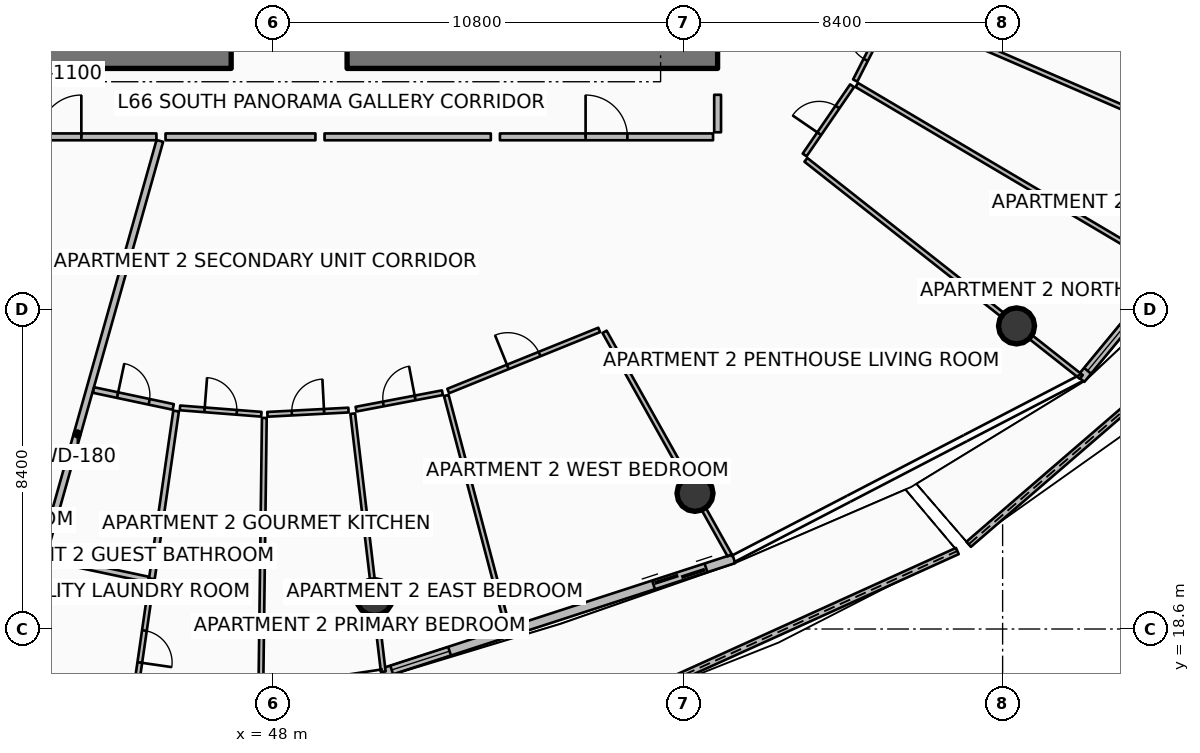
"""IFC4 building model, lengths in metres.
Left out: names, types, materials, properties, quantities, classifications, styles, units other than length and angle.
Written with IfcOpenShell. Run it as: python <this file> out.ifc"""

import sys

from ifc_helpers import new_model, si_unit, direction, frame, frame_2d, origin, origin_2d, place, context, subcontext, project, spatial, polyline, rectangle, circle, outline, extrude, element, fill, save


model = new_model("IFC4")
c1 = context("Model", 3, precision=1e-05, world=origin(), true_north=direction((0.0, 1.0)))
c2 = subcontext(c1, "Body", "Model", "MODEL_VIEW")
j1 = project(units=[si_unit("LENGTHUNIT", "METRE"), si_unit("PLANEANGLEUNIT", "RADIAN")], contexts=[c1])
p1 = place(None, origin())
s1 = spatial("IfcSite", under=j1, at=p1, CompositionType="ELEMENT")
p2 = place(p1, origin())
s2 = spatial("IfcBuilding", under=s1, at=p2, CompositionType="ELEMENT")
p3 = place(p2, frame((0.0, 0.0, 263.65)))
s3 = spatial("IfcBuildingStorey", under=s2, at=p3, CompositionType="ELEMENT", Elevation=263.65)
for number, where, z_axis, x_axis in (
    (1, (37.15, 33.675, 0.0), (0.0, 0.0, 1.0), (1.0, 0.0, 0.0)),
    (2, (49.95, 33.675, 0.0), (0.0, 0.0, 1.0), (1.0, 0.0, 0.0)),
):
    element("IfcWall", number, at=place(p3, frame(where, z_axis=z_axis, x_axis=x_axis)), inside=s3, PredefinedType="SHEAR", context=c2, shape_type="SweptSolid", body=[
        extrude(rectangle(XDim=9.75, YDim=0.65, at=frame_2d((4.875, 0.0))), origin(), (0.0, 0.0, 1.0), 3.85),
    ])
for number, where, z_axis, x_axis in (
    (3, (50.671, 19.429, 0.0), (0.0, 0.0, 1.0), (1.0, 0.0, 0.0)),
    (4, (59.105, 22.17, 0.0), (0.0, 0.0, 1.0), (1.0, 0.0, 0.0)),
    (5, (67.566, 26.575, 0.0), (0.0, 0.0, 1.0), (1.0, 0.0, 0.0)),
):
    element("IfcColumn", number, at=place(p3, frame(where, z_axis=z_axis, x_axis=x_axis)), inside=s3, PredefinedType="COLUMN", context=c2, shape_type="SweptSolid", body=[
        extrude(circle(Radius=0.475, at=origin_2d()), origin(), (0.0, 0.0, 1.0), 3.59),
    ])
p4 = place(p3, frame((56.466, 16.33, 0.0), z_axis=(0.0, 0.0, 1.0), x_axis=(0.910900469726, 0.412626143444, 0.0)))
e6 = element("IfcWall", 6, at=p4, inside=s3, PredefinedType="PARAPET", context=c2, shape_type="SweptSolid", body=[
    extrude(outline(polyline([(0.0, 0.0), (10.476, 0.0), (10.476, 1.497), (5.238, 1.696), (0.0, 1.832), (0.0, 0.0)])), frame((0.0, 0.09, 0.0), z_axis=(0.0, -1.0, 0.0), x_axis=(1.0, 0.0, 0.0)), (0.0, 0.0, 1.0), 0.18),
])
p5 = place(p3, frame((66.306, 20.83, 0.0), z_axis=(0.0, 0.0, 1.0), x_axis=(0.757188428153, 0.653196512751, 0.0)))
e7 = element("IfcWall", 7, at=p5, inside=s3, PredefinedType="PARAPET", context=c2, shape_type="SweptSolid", body=[
    extrude(outline(polyline([(0.0, 0.0), (11.278, 0.0), (11.278, 1.148), (5.639, 1.284), (0.0, 1.483), (0.0, 0.0)])), frame((0.0, 0.09, 0.0), z_axis=(0.0, -1.0, 0.0), x_axis=(1.0, 0.0, 0.0)), (0.0, 0.0, 1.0), 0.18),
])
p6 = place(p3, frame((50.858, 17.436, 0.0), z_axis=(0.0, 0.0, 1.0), x_axis=(0.951055974609, 0.309018661507, 0.0)))
e8 = element("IfcWall", 8, at=p6, inside=s3, PredefinedType="SOLIDWALL", context=c2, shape_type="SweptSolid", body=[
    extrude(rectangle(XDim=9.745, YDim=0.24, at=frame_2d((4.873, 0.0))), origin(), (0.0, 0.0, 1.0), 2.54),
])
p7 = place(p6, frame((7.525, 0.0, 0.0)))
e9 = element("IfcOpeningElement", 9, at=p7, cuts=e8, PredefinedType="OPENING", context=c2, shape_type="SweptSolid", body=[
    extrude(rectangle(XDim=1.45, YDim=2.15, at=frame_2d((0.725, 1.075))), frame((0.0, 0.13, 0.0), z_axis=(0.0, -1.0, 0.0), x_axis=(1.0, 0.0, 0.0)), (0.0, 0.0, 1.0), 0.26),
])
p8 = place(p6, frame((0.28, 0.0, 0.65)))
e10 = element("IfcOpeningElement", 10, at=p8, cuts=e8, PredefinedType="OPENING", context=c2, shape_type="SweptSolid", body=[
    extrude(rectangle(XDim=1.6, YDim=1.5, at=frame_2d((0.8, 0.75))), frame((0.0, 0.13, 0.0), z_axis=(0.0, -1.0, 0.0), x_axis=(1.0, 0.0, 0.0)), (0.0, 0.0, 1.0), 0.26),
])
p9 = place(p3, frame((69.258, 25.178, 0.0), z_axis=(0.0, 0.0, 1.0), x_axis=(0.636680093065, 0.771128043255, 0.0)))
e11 = element("IfcWall", 11, at=p9, inside=s3, PredefinedType="SOLIDWALL", context=c2, shape_type="SweptSolid", body=[
    extrude(rectangle(XDim=11.438, YDim=0.24, at=frame_2d((5.719, 0.0))), origin(), (0.0, 0.0, 1.0), 2.54),
])
p10 = place(p9, frame((9.218, 0.0, 0.0)))
e12 = element("IfcOpeningElement", 12, at=p10, cuts=e11, PredefinedType="OPENING", context=c2, shape_type="SweptSolid", body=[
    extrude(rectangle(XDim=1.45, YDim=2.15, at=frame_2d((0.725, 1.075))), frame((0.0, 0.13, 0.0), z_axis=(0.0, -1.0, 0.0), x_axis=(1.0, 0.0, 0.0)), (0.0, 0.0, 1.0), 0.26),
])
p11 = place(p9, frame((0.28, 0.0, 0.65)))
e13 = element("IfcOpeningElement", 13, at=p11, cuts=e11, PredefinedType="OPENING", context=c2, shape_type="SweptSolid", body=[
    extrude(rectangle(XDim=1.6, YDim=1.5, at=frame_2d((0.8, 0.75))), frame((0.0, 0.13, 0.0), z_axis=(0.0, -1.0, 0.0), x_axis=(1.0, 0.0, 0.0)), (0.0, 0.0, 1.0), 0.26),
])
p12 = place(p3, frame((45.023, 31.444, 0.0), z_axis=(0.0, 0.0, 1.0), x_axis=(-0.271442063103, -0.962454781472, 0.0)))
e14 = element("IfcWall", 14, at=p12, inside=s3, PredefinedType="PARTITIONING", context=c2, shape_type="SweptSolid", body=[
    extrude(rectangle(XDim=16.017, YDim=0.18, at=frame_2d((8.008, 0.0))), origin(), (0.0, 0.0, 1.0), 2.957),
])
p13 = place(p3, frame((39.882, 31.55, 0.0), z_axis=(0.0, 0.0, 1.0), x_axis=(1.0, 0.0, 0.0)))
e15 = element("IfcWall", 15, at=p13, inside=s3, PredefinedType="PARTITIONING", context=c2, shape_type="SweptSolid", body=[
    extrude(rectangle(XDim=5.051, YDim=0.18, at=frame_2d((2.525, 0.0))), origin(), (0.0, 0.0, 1.0), 2.957),
])
p14 = place(p13, frame((1.975, 0.0, 0.0)))
e16 = element("IfcOpeningElement", 16, at=p14, cuts=e15, PredefinedType="OPENING", context=c2, shape_type="SweptSolid", body=[
    extrude(rectangle(XDim=1.1, YDim=2.1, at=frame_2d((0.55, 1.05))), frame((0.0, 0.1, 0.0), z_axis=(0.0, -1.0, 0.0), x_axis=(1.0, 0.0, 0.0)), (0.0, 0.0, 1.0), 0.2),
])
p15 = place(p3, frame((53.972, 31.55, 0.0), z_axis=(0.0, 0.0, 1.0), x_axis=(1.0, 0.0, 0.0)))
e17 = element("IfcWall", 17, at=p15, inside=s3, PredefinedType="PARTITIONING", context=c2, shape_type="SweptSolid", body=[
    extrude(rectangle(XDim=5.608, YDim=0.18, at=frame_2d((2.804, 0.0))), origin(), (0.0, 0.0, 1.0), 2.957),
])
p16 = place(p15, frame((2.254, 0.0, 0.0)))
e18 = element("IfcOpeningElement", 18, at=p16, cuts=e17, PredefinedType="OPENING", context=c2, shape_type="SweptSolid", body=[
    extrude(rectangle(XDim=1.1, YDim=2.1, at=frame_2d((0.55, 1.05))), frame((0.0, 0.1, 0.0), z_axis=(0.0, -1.0, 0.0), x_axis=(1.0, 0.0, 0.0)), (0.0, 0.0, 1.0), 0.2),
])
p17 = place(p3, frame((59.7, 31.67, 0.0), z_axis=(0.0, 0.0, 1.0), x_axis=(0.0, 1.0, 0.0)))
e19 = element("IfcWall", 19, at=p17, inside=s3, PredefinedType="PARTITIONING", context=c2, shape_type="SweptSolid", body=[
    extrude(rectangle(XDim=0.987, YDim=0.18, at=frame_2d((0.493, 0.0))), origin(), (0.0, 0.0, 1.0), 2.957),
])
p18 = place(p3, frame((45.173, 31.55, 0.0), z_axis=(0.0, 0.0, 1.0), x_axis=(1.0, 0.0, 0.0)))
e20 = element("IfcWall", 20, at=p18, inside=s3, PredefinedType="PARTITIONING", context=c2, shape_type="SweptSolid", body=[
    extrude(rectangle(XDim=3.944, YDim=0.18, at=frame_2d((1.972, 0.0))), origin(), (0.0, 0.0, 1.0), 2.957),
])
p19 = place(p3, frame((43.278, 24.889, 0.0), z_axis=(0.0, 0.0, 1.0), x_axis=(0.978223618973, -0.207553731074, 0.0)))
e21 = element("IfcWall", 21, at=p19, inside=s3, PredefinedType="PARTITIONING", context=c2, shape_type="SweptSolid", body=[
    extrude(rectangle(XDim=2.144, YDim=0.15, at=frame_2d((1.072, 0.0))), origin(), (0.0, 0.0, 1.0), 2.957),
])
p20 = place(p19, frame((0.647, 0.0, 0.0)))
e22 = element("IfcOpeningElement", 22, at=p20, cuts=e21, PredefinedType="OPENING", context=c2, shape_type="SweptSolid", body=[
    extrude(rectangle(XDim=0.85, YDim=2.06, at=frame_2d((0.425, 1.03))), frame((0.0, 0.085, 0.0), z_axis=(0.0, -1.0, 0.0), x_axis=(1.0, 0.0, 0.0)), (0.0, 0.0, 1.0), 0.17),
])
p21 = place(p3, frame((42.032, 20.471, 0.0), z_axis=(0.0, 0.0, 1.0), x_axis=(0.978220458767, -0.207568624914, 0.0)))
e23 = element("IfcWall", 23, at=p21, inside=s3, PredefinedType="PARTITIONING", context=c2, shape_type="SweptSolid", body=[
    extrude(rectangle(XDim=2.748, YDim=0.15, at=frame_2d((1.374, 0.0))), origin(), (0.0, 0.0, 1.0), 2.957),
])
p22 = place(p3, frame((45.451, 24.336, 0.0), z_axis=(0.0, 0.0, 1.0), x_axis=(-0.142877347864, -0.989740402059, 0.0)))
e24 = element("IfcWall", 24, at=p22, inside=s3, PredefinedType="PARTITIONING", context=c2, shape_type="SweptSolid", body=[
    extrude(rectangle(XDim=4.46, YDim=0.15, at=frame_2d((2.23, 0.0))), origin(), (0.0, 0.0, 1.0), 3.03),
])
p23 = place(p3, frame((44.795, 19.793, 0.0), z_axis=(0.0, 0.0, 1.0), x_axis=(-0.142812082151, -0.989749821516, 0.0)))
e25 = element("IfcWall", 25, at=p23, inside=s3, PredefinedType="PARTITIONING", context=c2, shape_type="SweptSolid", body=[
    extrude(rectangle(XDim=3.342, YDim=0.125, at=frame_2d((1.671, 0.0))), origin(), (0.0, 0.0, 1.0), 3.03),
])
p24 = place(p23, frame((1.246, 0.0, 0.0)))
e26 = element("IfcOpeningElement", 26, at=p24, cuts=e25, PredefinedType="OPENING", context=c2, shape_type="SweptSolid", body=[
    extrude(rectangle(XDim=0.85, YDim=2.06, at=frame_2d((0.425, 1.03))), frame((0.0, 0.073, 0.0), z_axis=(0.0, -1.0, 0.0), x_axis=(1.0, 0.0, 0.0)), (0.0, 0.0, 1.0), 0.145),
])
p25 = place(p3, frame((47.772, 24.154, 0.0), z_axis=(0.0, 0.0, 1.0), x_axis=(-0.012746936198, -0.999918754508, 0.0)))
e27 = element("IfcWall", 27, at=p25, inside=s3, PredefinedType="PARTITIONING", context=c2, shape_type="SweptSolid", body=[
    extrude(rectangle(XDim=7.163, YDim=0.125, at=frame_2d((3.582, 0.0))), origin(), (0.0, 0.0, 1.0), 3.03),
])
p26 = place(p3, frame((45.553, 24.418, 0.0), z_axis=(0.0, 0.0, 1.0), x_axis=(0.99694376357, -0.078122546546, 0.0)))
e28 = element("IfcWall", 28, at=p26, inside=s3, PredefinedType="PARTITIONING", context=c2, shape_type="SweptSolid", body=[
    extrude(rectangle(XDim=2.147, YDim=0.125, at=frame_2d((1.073, 0.0))), origin(), (0.0, 0.0, 1.0), 3.03),
])
p27 = place(p26, frame((0.648, 0.0, 0.0)))
e29 = element("IfcOpeningElement", 29, at=p27, cuts=e28, PredefinedType="OPENING", context=c2, shape_type="SweptSolid", body=[
    extrude(rectangle(XDim=0.85, YDim=2.06, at=frame_2d((0.425, 1.03))), frame((0.0, 0.073, 0.0), z_axis=(0.0, -1.0, 0.0), x_axis=(1.0, 0.0, 0.0)), (0.0, 0.0, 1.0), 0.145),
])
p28 = place(p3, frame((47.853, 24.249, 0.0), z_axis=(0.0, 0.0, 1.0), x_axis=(0.998618144909, 0.052552836822, 0.0)))
e30 = element("IfcWall", 30, at=p28, inside=s3, PredefinedType="PARTITIONING", context=c2, shape_type="SweptSolid", body=[
    extrude(rectangle(XDim=2.137, YDim=0.125, at=frame_2d((1.068, 0.0))), origin(), (0.0, 0.0, 1.0), 3.03),
])
p29 = place(p28, frame((0.643, 0.0, 0.0)))
e31 = element("IfcOpeningElement", 31, at=p29, cuts=e30, PredefinedType="OPENING", context=c2, shape_type="SweptSolid", body=[
    extrude(rectangle(XDim=0.85, YDim=2.06, at=frame_2d((0.425, 1.03))), frame((0.0, 0.073, 0.0), z_axis=(0.0, -1.0, 0.0), x_axis=(1.0, 0.0, 0.0)), (0.0, 0.0, 1.0), 0.145),
])
p30 = place(p3, frame((49.357, 31.55, 0.0), z_axis=(0.0, 0.0, 1.0), x_axis=(1.0, 0.0, 0.0)))
e32 = element("IfcWall", 32, at=p30, inside=s3, PredefinedType="PARTITIONING", context=c2, shape_type="SweptSolid", body=[
    extrude(rectangle(XDim=4.376, YDim=0.18, at=frame_2d((2.188, 0.0))), origin(), (0.0, 0.0, 1.0), 2.957),
])
p31 = place(p3, frame((50.099, 24.267, 0.0), z_axis=(0.0, 0.0, 1.0), x_axis=(0.117541429875, -0.993067979679, 0.0)))
e33 = element("IfcWall", 33, at=p31, inside=s3, PredefinedType="PARTITIONING", context=c2, shape_type="SweptSolid", body=[
    extrude(rectangle(XDim=6.838, YDim=0.125, at=frame_2d((3.419, 0.0))), origin(), (0.0, 0.0, 1.0), 2.957),
])
p32 = place(p3, frame((56.725, 26.42, 0.0), z_axis=(0.0, 0.0, 1.0), x_axis=(0.488624332812, -0.872494275846, 0.0)))
e34 = element("IfcWall", 34, at=p32, inside=s3, PredefinedType="PARTITIONING", context=c2, shape_type="SweptSolid", body=[
    extrude(rectangle(XDim=6.738, YDim=0.125, at=frame_2d((3.369, 0.0))), origin(), (0.0, 0.0, 1.0), 2.957),
])
p33 = place(p3, frame((52.56, 24.746, 0.0), z_axis=(0.0, 0.0, 1.0), x_axis=(0.255531000294, -0.966800862582, 0.0)))
e35 = element("IfcWall", 35, at=p33, inside=s3, PredefinedType="PARTITIONING", context=c2, shape_type="SweptSolid", body=[
    extrude(rectangle(XDim=6.311, YDim=0.125, at=frame_2d((3.155, 0.0))), origin(), (0.0, 0.0, 1.0), 3.03),
])
p34 = place(p3, frame((50.185, 24.385, 0.0), z_axis=(0.0, 0.0, 1.0), x_axis=(0.982371792313, 0.186937587627, 0.0)))
e36 = element("IfcWall", 36, at=p34, inside=s3, PredefinedType="PARTITIONING", context=c2, shape_type="SweptSolid", body=[
    extrude(rectangle(XDim=2.314, YDim=0.125, at=frame_2d((1.157, 0.0))), origin(), (0.0, 0.0, 1.0), 2.957),
])
p35 = place(p34, frame((0.732, 0.0, 0.0)))
e37 = element("IfcOpeningElement", 37, at=p35, cuts=e36, PredefinedType="OPENING", context=c2, shape_type="SweptSolid", body=[
    extrude(rectangle(XDim=0.85, YDim=2.06, at=frame_2d((0.425, 1.03))), frame((0.0, 0.073, 0.0), z_axis=(0.0, -1.0, 0.0), x_axis=(1.0, 0.0, 0.0)), (0.0, 0.0, 1.0), 0.145),
])
p36 = place(p3, frame((52.612, 24.863, 0.0), z_axis=(0.0, 0.0, 1.0), x_axis=(0.927015680649, 0.375022569762, 0.0)))
e38 = element("IfcWall", 38, at=p36, inside=s3, PredefinedType="PARTITIONING", context=c2, shape_type="SweptSolid", body=[
    extrude(rectangle(XDim=4.285, YDim=0.125, at=frame_2d((2.143, 0.0))), origin(), (0.0, 0.0, 1.0), 2.957),
])
p37 = place(p36, frame((1.692, 0.0, 0.0)))
e39 = element("IfcOpeningElement", 39, at=p37, cuts=e38, PredefinedType="OPENING", context=c2, shape_type="SweptSolid", body=[
    extrude(rectangle(XDim=0.9, YDim=2.08, at=frame_2d((0.45, 1.04))), frame((0.0, 0.073, 0.0), z_axis=(0.0, -1.0, 0.0), x_axis=(1.0, 0.0, 0.0)), (0.0, 0.0, 1.0), 0.145),
])
p38 = place(p3, frame((62.023, 30.945, 0.0), z_axis=(0.0, 0.0, 1.0), x_axis=(0.785322102606, -0.619087388952, 0.0)))
e40 = element("IfcWall", 40, at=p38, inside=s3, PredefinedType="PARTITIONING", context=c2, shape_type="SweptSolid", body=[
    extrude(rectangle(XDim=9.228, YDim=0.125, at=frame_2d((4.614, 0.0))), origin(), (0.0, 0.0, 1.0), 2.957),
])
p39 = place(p3, frame((63.362, 32.915, 0.0), z_axis=(0.0, 0.0, 1.0), x_axis=(0.860726173163, -0.509068222178, 0.0)))
e41 = element("IfcWall", 41, at=p39, inside=s3, PredefinedType="PARTITIONING", context=c2, shape_type="SweptSolid", body=[
    extrude(rectangle(XDim=9.464, YDim=0.125, at=frame_2d((4.732, 0.0))), origin(), (0.0, 0.0, 1.0), 3.03),
])
p40 = place(p3, frame((64.379, 34.912, 0.0), z_axis=(0.0, 0.0, 1.0), x_axis=(0.917754922423, -0.397147204912, 0.0)))
e42 = element("IfcWall", 42, at=p40, inside=s3, PredefinedType="PARTITIONING", context=c2, shape_type="SweptSolid", body=[
    extrude(rectangle(XDim=10.243, YDim=0.125, at=frame_2d((5.122, 0.0))), origin(), (0.0, 0.0, 1.0), 3.03),
])
p41 = place(p3, frame((61.99, 31.073, 0.0), z_axis=(0.0, 0.0, 1.0), x_axis=(0.565365127096, 0.824840756185, 0.0)))
e43 = element("IfcWall", 43, at=p41, inside=s3, PredefinedType="PARTITIONING", context=c2, shape_type="SweptSolid", body=[
    extrude(rectangle(XDim=2.209, YDim=0.125, at=frame_2d((1.104, 0.0))), origin(), (0.0, 0.0, 1.0), 2.957),
])
p42 = place(p41, frame((0.68, 0.0, 0.0)))
e44 = element("IfcOpeningElement", 44, at=p42, cuts=e43, PredefinedType="OPENING", context=c2, shape_type="SweptSolid", body=[
    extrude(rectangle(XDim=0.85, YDim=2.06, at=frame_2d((0.425, 1.03))), frame((0.0, 0.073, 0.0), z_axis=(0.0, -1.0, 0.0), x_axis=(1.0, 0.0, 0.0)), (0.0, 0.0, 1.0), 0.145),
])
p43 = place(p3, frame((63.321, 33.032, 0.0), z_axis=(0.0, 0.0, 1.0), x_axis=(0.453994690579, 0.891004388837, 0.0)))
e45 = element("IfcWall", 45, at=p43, inside=s3, PredefinedType="PARTITIONING", context=c2, shape_type="SweptSolid", body=[
    extrude(rectangle(XDim=2.07, YDim=0.125, at=frame_2d((1.035, 0.0))), origin(), (0.0, 0.0, 1.0), 3.03),
])
p44 = place(p43, frame((0.61, 0.0, 0.0)))
e46 = element("IfcOpeningElement", 46, at=p44, cuts=e45, PredefinedType="OPENING", context=c2, shape_type="SweptSolid", body=[
    extrude(rectangle(XDim=0.85, YDim=2.06, at=frame_2d((0.425, 1.03))), frame((0.0, 0.073, 0.0), z_axis=(0.0, -1.0, 0.0), x_axis=(1.0, 0.0, 0.0)), (0.0, 0.0, 1.0), 0.145),
])
p45 = place(p7, origin())
e47 = element("IfcDoor", 47, at=p45, inside=s3, OperationType="DOUBLE_DOOR_SLIDING", PredefinedType="DOOR", context=c2, shape_type="SweptSolid", body=[
    extrude(rectangle(XDim=1.45, YDim=2.15, at=frame_2d((0.725, 1.075))), frame((0.0, 0.025, 0.0), z_axis=(0.0, -1.0, 0.0), x_axis=(1.0, 0.0, 0.0)), (0.0, 0.0, 1.0), 0.05),
])
fill(e9, e47)
p46 = place(p8, origin())
e48 = element("IfcWindow", 48, at=p46, inside=s3, PartitioningType="SINGLE_PANEL", PredefinedType="WINDOW", context=c2, shape_type="SweptSolid", body=[
    extrude(rectangle(XDim=1.6, YDim=1.5, at=frame_2d((0.8, 0.75))), frame((0.0, 0.03, 0.0), z_axis=(0.0, -1.0, 0.0), x_axis=(1.0, 0.0, 0.0)), (0.0, 0.0, 1.0), 0.06),
])
fill(e10, e48)
p47 = place(p11, origin())
e49 = element("IfcWindow", 49, at=p47, inside=s3, PartitioningType="SINGLE_PANEL", PredefinedType="WINDOW", context=c2, shape_type="SweptSolid", body=[
    extrude(rectangle(XDim=1.6, YDim=1.5, at=frame_2d((0.8, 0.75))), frame((0.0, 0.03, 0.0), z_axis=(0.0, -1.0, 0.0), x_axis=(1.0, 0.0, 0.0)), (0.0, 0.0, 1.0), 0.06),
])
fill(e13, e49)
p48 = place(p14, origin())
e50 = element("IfcDoor", 50, at=p48, inside=s3, OperationType="SINGLE_SWING_RIGHT", PredefinedType="DOOR", context=c2, shape_type="SweptSolid", body=[
    extrude(rectangle(XDim=1.1, YDim=2.1, at=frame_2d((0.55, 1.05))), frame((0.0, 0.025, 0.0), z_axis=(0.0, -1.0, 0.0), x_axis=(1.0, 0.0, 0.0)), (0.0, 0.0, 1.0), 0.05),
])
fill(e16, e50)
p49 = place(p16, origin())
e51 = element("IfcDoor", 51, at=p49, inside=s3, OperationType="SINGLE_SWING_LEFT", PredefinedType="DOOR", context=c2, shape_type="SweptSolid", body=[
    extrude(rectangle(XDim=1.1, YDim=2.1, at=frame_2d((0.55, 1.05))), frame((0.0, 0.025, 0.0), z_axis=(0.0, -1.0, 0.0), x_axis=(1.0, 0.0, 0.0)), (0.0, 0.0, 1.0), 0.05),
])
fill(e18, e51)
p50 = place(p20, origin())
e52 = element("IfcDoor", 52, at=p50, inside=s3, OperationType="SINGLE_SWING_LEFT", PredefinedType="DOOR", context=c2, shape_type="SweptSolid", body=[
    extrude(rectangle(XDim=0.85, YDim=2.06, at=frame_2d((0.425, 1.03))), frame((0.0, 0.025, 0.0), z_axis=(0.0, -1.0, 0.0), x_axis=(1.0, 0.0, 0.0)), (0.0, 0.0, 1.0), 0.05),
])
fill(e22, e52)
p51 = place(p24, origin())
e53 = element("IfcDoor", 53, at=p51, inside=s3, OperationType="SINGLE_SWING_RIGHT", PredefinedType="DOOR", context=c2, shape_type="SweptSolid", body=[
    extrude(rectangle(XDim=0.85, YDim=2.06, at=frame_2d((0.425, 1.03))), frame((0.0, 0.025, 0.0), z_axis=(0.0, -1.0, 0.0), x_axis=(1.0, 0.0, 0.0)), (0.0, 0.0, 1.0), 0.05),
])
fill(e26, e53)
p52 = place(p27, origin())
e54 = element("IfcDoor", 54, at=p52, inside=s3, OperationType="SINGLE_SWING_LEFT", PredefinedType="DOOR", context=c2, shape_type="SweptSolid", body=[
    extrude(rectangle(XDim=0.85, YDim=2.06, at=frame_2d((0.425, 1.03))), frame((0.0, 0.025, 0.0), z_axis=(0.0, -1.0, 0.0), x_axis=(1.0, 0.0, 0.0)), (0.0, 0.0, 1.0), 0.05),
])
fill(e29, e54)
p53 = place(p29, origin())
e55 = element("IfcDoor", 55, at=p53, inside=s3, OperationType="SINGLE_SWING_RIGHT", PredefinedType="DOOR", context=c2, shape_type="SweptSolid", body=[
    extrude(rectangle(XDim=0.85, YDim=2.06, at=frame_2d((0.425, 1.03))), frame((0.0, 0.025, 0.0), z_axis=(0.0, -1.0, 0.0), x_axis=(1.0, 0.0, 0.0)), (0.0, 0.0, 1.0), 0.05),
])
fill(e31, e55)
p54 = place(p35, origin())
e56 = element("IfcDoor", 56, at=p54, inside=s3, OperationType="SINGLE_SWING_RIGHT", PredefinedType="DOOR", context=c2, shape_type="SweptSolid", body=[
    extrude(rectangle(XDim=0.85, YDim=2.06, at=frame_2d((0.425, 1.03))), frame((0.0, 0.025, 0.0), z_axis=(0.0, -1.0, 0.0), x_axis=(1.0, 0.0, 0.0)), (0.0, 0.0, 1.0), 0.05),
])
fill(e37, e56)
p55 = place(p37, origin())
e57 = element("IfcDoor", 57, at=p55, inside=s3, OperationType="SINGLE_SWING_LEFT", PredefinedType="DOOR", context=c2, shape_type="SweptSolid", body=[
    extrude(rectangle(XDim=0.9, YDim=2.08, at=frame_2d((0.45, 1.04))), frame((0.0, 0.025, 0.0), z_axis=(0.0, -1.0, 0.0), x_axis=(1.0, 0.0, 0.0)), (0.0, 0.0, 1.0), 0.05),
])
fill(e39, e57)
p56 = place(p42, origin())
e58 = element("IfcDoor", 58, at=p56, inside=s3, OperationType="SINGLE_SWING_LEFT", PredefinedType="DOOR", context=c2, shape_type="SweptSolid", body=[
    extrude(rectangle(XDim=0.85, YDim=2.06, at=frame_2d((0.425, 1.03))), frame((0.0, 0.025, 0.0), z_axis=(0.0, -1.0, 0.0), x_axis=(1.0, 0.0, 0.0)), (0.0, 0.0, 1.0), 0.05),
])
fill(e44, e58)
p57 = place(p44, origin())
e59 = element("IfcDoor", 59, at=p57, inside=s3, OperationType="SINGLE_SWING_RIGHT", PredefinedType="DOOR", context=c2, shape_type="SweptSolid", body=[
    extrude(rectangle(XDim=0.85, YDim=2.06, at=frame_2d((0.425, 1.03))), frame((0.0, 0.025, 0.0), z_axis=(0.0, -1.0, 0.0), x_axis=(1.0, 0.0, 0.0)), (0.0, 0.0, 1.0), 0.05),
])
fill(e46, e59)
save(model, sys.argv[1])
